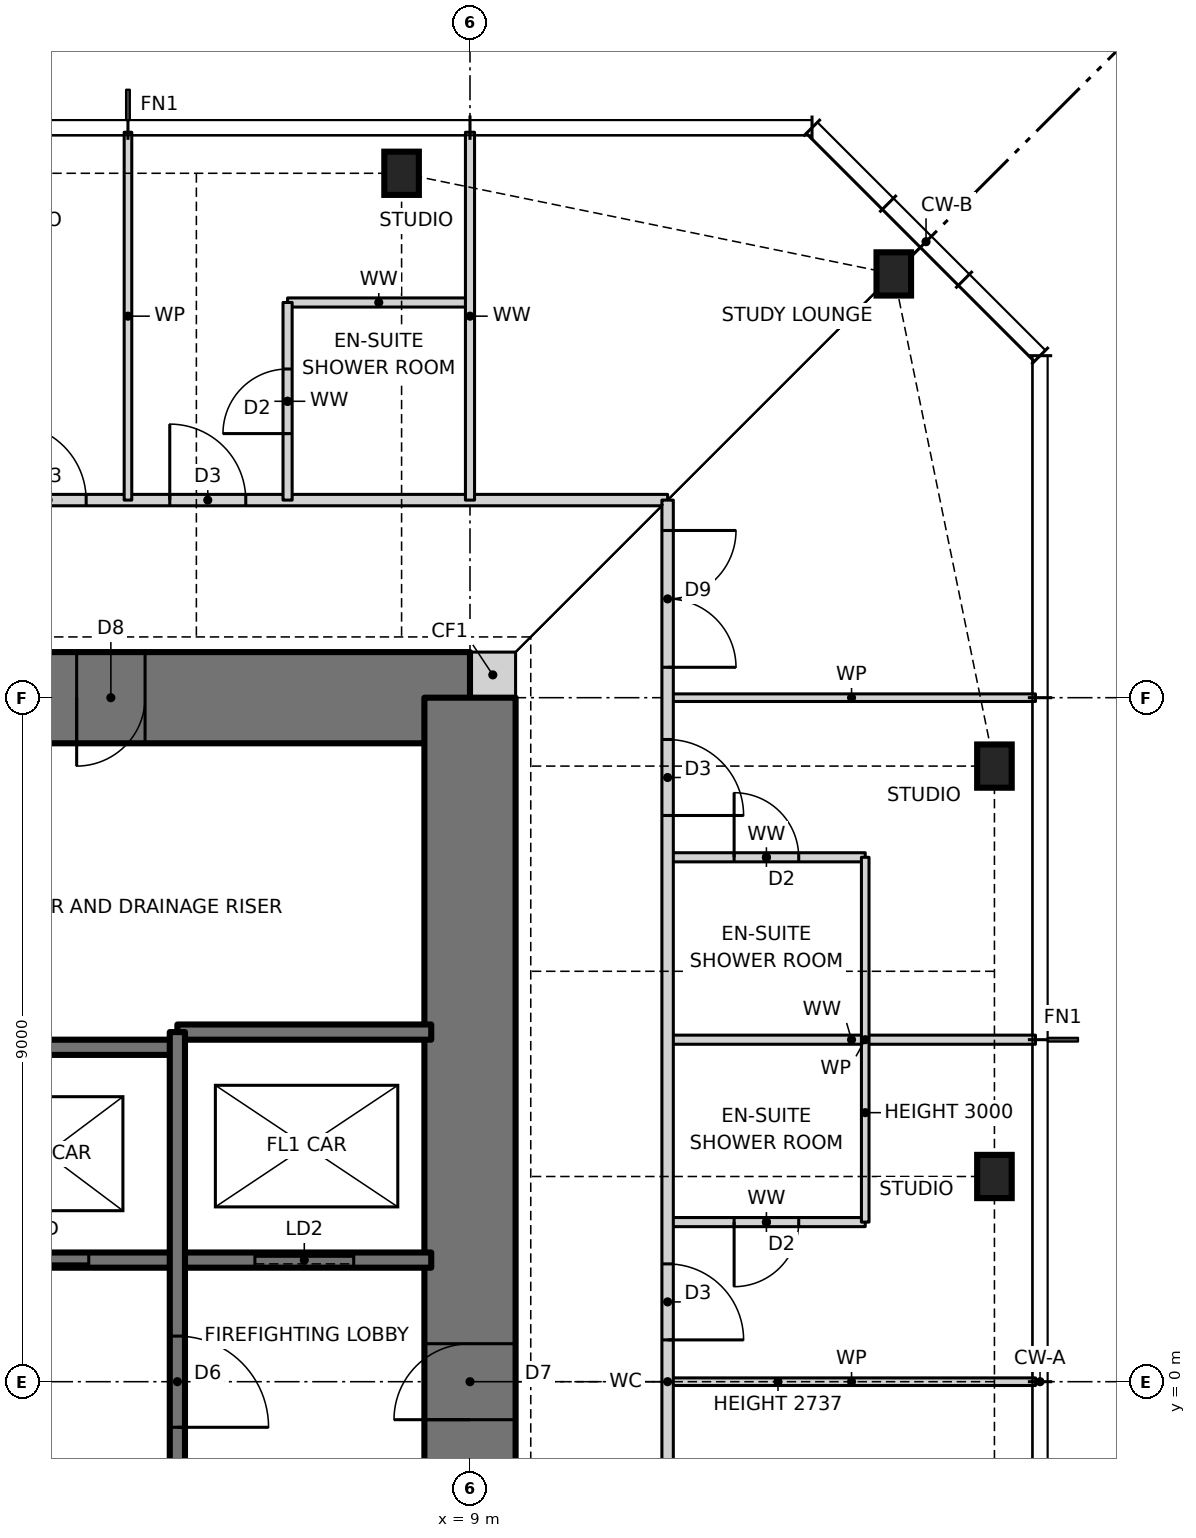
"""IFC4 building model, lengths in metres.
Left out: names, types, materials, properties, quantities, classifications, styles, units other than length and angle.
Written with IfcOpenShell. Run it as: python <this file> out.ifc"""

import sys

from ifc_helpers import new_model, si_unit, direction, frame, frame_2d, origin, origin_2d, place, context, subcontext, project, spatial, rectangle, i_section, extrude, element, fill, save


model = new_model("IFC4")
c1 = context("Model", 3, precision=1e-05, world=origin(), true_north=direction((0.0, 1.0)))
c2 = subcontext(c1, "Body", "Model", "MODEL_VIEW")
j1 = project(units=[si_unit("LENGTHUNIT", "METRE"), si_unit("PLANEANGLEUNIT", "RADIAN")], contexts=[c1])
p1 = place(None, origin())
s1 = spatial("IfcSite", under=j1, at=p1, CompositionType="ELEMENT")
p2 = place(p1, origin())
s2 = spatial("IfcBuilding", under=s1, at=p2, CompositionType="ELEMENT")
p3 = place(p2, frame((0.0, 0.0, 225.5)))
s3 = spatial("IfcBuildingStorey", under=s2, at=p3, CompositionType="ELEMENT", Elevation=225.5)
for number, where, z_axis, x_axis in (
    (1, (15.9, 2.7, 0.0), (0.0, 0.0, 1.0), (1.0, 0.0, 0.0)),
    (2, (15.9, 8.1, 0.0), (0.0, 0.0, 1.0), (1.0, 0.0, 0.0)),
    (3, (14.576, 14.576, 0.0), (0.0, 0.0, 1.0), (1.0, 0.0, 0.0)),
    (4, (8.1, 15.9, 0.0), (0.0, 0.0, 1.0), (1.0, 0.0, 0.0)),
):
    element("IfcColumn", number, at=place(p3, frame(where, z_axis=z_axis, x_axis=x_axis)), inside=s3, PredefinedType="COLUMN", context=c2, shape_type="SweptSolid", body=[
        extrude(i_section(OverallWidth=0.455, OverallDepth=0.569, WebThickness=0.078, FlangeThickness=0.125, at=origin_2d()), origin(), (0.0, 0.0, 1.0), 3.5),
    ])
p4 = place(p3, frame((9.0, 9.3, 0.0), z_axis=(0.0, 0.0, 1.0), x_axis=(1.0, 0.0, 0.0)))
e5 = element("IfcWall", 5, at=p4, inside=s3, PredefinedType="SOLIDWALL", context=c2, shape_type="SweptSolid", body=[
    extrude(rectangle(XDim=0.6, YDim=0.6, at=frame_2d((0.3, 0.0))), origin(), (0.0, 0.0, 1.0), 3.5),
])
p5 = place(p3, frame((9.0, 9.0, 0.0), z_axis=(0.0, 0.0, 1.0), x_axis=(-1.0, 0.0, 0.0)))
e6 = element("IfcWall", 6, at=p5, inside=s3, PredefinedType="SHEAR", context=c2, shape_type="SweptSolid", body=[
    extrude(rectangle(XDim=18.0, YDim=1.2, at=frame_2d((9.0, 0.0))), origin(), (0.0, 0.0, 1.0), 3.5),
])
p6 = place(p5, frame((11.125, 0.0, 0.0)))
e7 = element("IfcOpeningElement", 7, at=p6, cuts=e6, PredefinedType="OPENING", context=c2, shape_type="SweptSolid", body=[
    extrude(rectangle(XDim=0.9, YDim=2.1, at=frame_2d((0.45, 1.05))), frame((0.0, 0.61, 0.0), z_axis=(0.0, -1.0, 0.0), x_axis=(1.0, 0.0, 0.0)), (0.0, 0.0, 1.0), 1.22),
])
p7 = place(p5, frame((4.275, 0.0, 0.0)))
e8 = element("IfcOpeningElement", 8, at=p7, cuts=e6, PredefinedType="OPENING", context=c2, shape_type="SweptSolid", body=[
    extrude(rectangle(XDim=0.9, YDim=2.1, at=frame_2d((0.45, 1.05))), frame((0.0, 0.61, 0.0), z_axis=(0.0, -1.0, 0.0), x_axis=(1.0, 0.0, 0.0)), (0.0, 0.0, 1.0), 1.22),
])
p8 = place(p3, frame((9.0, -9.0, 0.0), z_axis=(0.0, 0.0, 1.0), x_axis=(0.0, 1.0, 0.0)))
e9 = element("IfcWall", 9, at=p8, inside=s3, PredefinedType="SHEAR", context=c2, shape_type="SweptSolid", body=[
    extrude(rectangle(XDim=18.0, YDim=1.2, at=frame_2d((9.0, 0.0))), origin(), (0.0, 0.0, 1.0), 3.5),
])
p9 = place(p8, frame((8.5, 0.0, 0.0)))
e10 = element("IfcOpeningElement", 10, at=p9, cuts=e9, PredefinedType="OPENING", context=c2, shape_type="SweptSolid", body=[
    extrude(rectangle(XDim=1.0, YDim=2.1, at=frame_2d((0.5, 1.05))), frame((0.0, 0.61, 0.0), z_axis=(0.0, -1.0, 0.0), x_axis=(1.0, 0.0, 0.0)), (0.0, 0.0, 1.0), 1.22),
])
p10 = place(p3, frame((11.6, 0.0, 0.0), z_axis=(0.0, 0.0, 1.0), x_axis=(1.0, 0.0, 0.0)))
e11 = element("IfcWall", 11, at=p10, inside=s3, PredefinedType="PARTITIONING", context=c2, shape_type="SweptSolid", body=[
    extrude(rectangle(XDim=4.84, YDim=0.1, at=frame_2d((2.42, 0.0))), origin(), (0.0, 0.0, 1.0), 2.737),
])
p11 = place(p3, frame((-8.49, 1.6, 0.0), z_axis=(0.0, 0.0, 1.0), x_axis=(1.0, 0.0, 0.0)))
e12 = element("IfcWall", 12, at=p11, inside=s3, PredefinedType="SOLIDWALL", context=c2, shape_type="SweptSolid", body=[
    extrude(rectangle(XDim=16.98, YDim=0.2, at=frame_2d((8.49, 0.0))), origin(), (0.0, 0.0, 1.0), 3.5),
])
p12 = place(p11, frame((1.17, 0.0, 0.0)))
e13 = element("IfcOpeningElement", 13, at=p12, cuts=e12, PredefinedType="OPENING", context=c2, shape_type="SweptSolid", body=[
    extrude(rectangle(XDim=1.0, YDim=2.1, at=frame_2d((0.5, 1.05))), frame((0.0, 0.11, 0.0), z_axis=(0.0, -1.0, 0.0), x_axis=(1.0, 0.0, 0.0)), (0.0, 0.0, 1.0), 0.22),
])
p13 = place(p11, frame((4.606, 0.0, 0.0)))
e14 = element("IfcOpeningElement", 14, at=p13, cuts=e12, PredefinedType="OPENING", context=c2, shape_type="SweptSolid", body=[
    extrude(rectangle(XDim=0.9, YDim=2.1, at=frame_2d((0.45, 1.05))), frame((0.0, 0.11, 0.0), z_axis=(0.0, -1.0, 0.0), x_axis=(1.0, 0.0, 0.0)), (0.0, 0.0, 1.0), 0.22),
])
p14 = place(p11, frame((8.04, 0.0, 0.0)))
e15 = element("IfcOpeningElement", 15, at=p14, cuts=e12, PredefinedType="OPENING", context=c2, shape_type="SweptSolid", body=[
    extrude(rectangle(XDim=0.9, YDim=2.1, at=frame_2d((0.45, 1.05))), frame((0.0, 0.11, 0.0), z_axis=(0.0, -1.0, 0.0), x_axis=(1.0, 0.0, 0.0)), (0.0, 0.0, 1.0), 0.22),
])
p15 = place(p11, frame((11.374, 0.0, 0.0)))
e16 = element("IfcOpeningElement", 16, at=p15, cuts=e12, PredefinedType="OPENING", context=c2, shape_type="SweptSolid", body=[
    extrude(rectangle(XDim=1.1, YDim=2.1, at=frame_2d((0.55, 1.05))), frame((0.0, 0.11, 0.0), z_axis=(0.0, -1.0, 0.0), x_axis=(1.0, 0.0, 0.0)), (0.0, 0.0, 1.0), 0.22),
])
p16 = place(p11, frame((14.66, 0.0, 0.0)))
e17 = element("IfcOpeningElement", 17, at=p16, cuts=e12, PredefinedType="OPENING", context=c2, shape_type="SweptSolid", body=[
    extrude(rectangle(XDim=1.3, YDim=2.1, at=frame_2d((0.65, 1.05))), frame((0.0, 0.11, 0.0), z_axis=(0.0, -1.0, 0.0), x_axis=(1.0, 0.0, 0.0)), (0.0, 0.0, 1.0), 0.22),
])
p17 = place(p3, frame((11.6, 2.1, 0.0), z_axis=(0.0, 0.0, 1.0), x_axis=(1.0, 0.0, 0.0)))
e18 = element("IfcWall", 18, at=p17, inside=s3, PredefinedType="PARTITIONING", context=c2, shape_type="SweptSolid", body=[
    extrude(rectangle(XDim=2.6, YDim=0.12, at=frame_2d((1.3, 0.0))), origin(), (0.0, 0.0, 1.0), 3.27),
])
p18 = place(p17, frame((0.875, 0.0, 0.0)))
e19 = element("IfcOpeningElement", 19, at=p18, cuts=e18, PredefinedType="OPENING", context=c2, shape_type="SweptSolid", body=[
    extrude(rectangle(XDim=0.85, YDim=2.1, at=frame_2d((0.425, 1.05))), frame((0.0, 0.07, 0.0), z_axis=(0.0, -1.0, 0.0), x_axis=(1.0, 0.0, 0.0)), (0.0, 0.0, 1.0), 0.14),
])
p19 = place(p3, frame((-5.15, 4.4, 0.0), z_axis=(0.0, 0.0, 1.0), x_axis=(1.0, 0.0, 0.0)))
e20 = element("IfcWall", 20, at=p19, inside=s3, PredefinedType="SOLIDWALL", context=c2, shape_type="SweptSolid", body=[
    extrude(rectangle(XDim=10.3, YDim=0.2, at=frame_2d((5.15, 0.0))), origin(), (0.0, 0.0, 1.0), 3.5),
])
p20 = place(p3, frame((11.6, 4.5, 0.0), z_axis=(0.0, 0.0, 1.0), x_axis=(1.0, 0.0, 0.0)))
e21 = element("IfcWall", 21, at=p20, inside=s3, PredefinedType="PARTITIONING", context=c2, shape_type="SweptSolid", body=[
    extrude(rectangle(XDim=4.84, YDim=0.12, at=frame_2d((2.42, 0.0))), origin(), (0.0, 0.0, 1.0), 3.27),
])
p21 = place(p3, frame((5.15, 4.6, 0.0), z_axis=(0.0, 0.0, 1.0), x_axis=(1.0, 0.0, 0.0)))
e22 = element("IfcWall", 22, at=p21, inside=s3, PredefinedType="SOLIDWALL", context=c2, shape_type="SweptSolid", body=[
    extrude(rectangle(XDim=3.34, YDim=0.2, at=frame_2d((1.67, 0.0))), origin(), (0.0, 0.0, 1.0), 3.5),
])
p22 = place(p3, frame((11.6, 6.9, 0.0), z_axis=(0.0, 0.0, 1.0), x_axis=(1.0, 0.0, 0.0)))
e23 = element("IfcWall", 23, at=p22, inside=s3, PredefinedType="PARTITIONING", context=c2, shape_type="SweptSolid", body=[
    extrude(rectangle(XDim=2.6, YDim=0.12, at=frame_2d((1.3, 0.0))), origin(), (0.0, 0.0, 1.0), 3.27),
])
p23 = place(p22, frame((0.875, 0.0, 0.0)))
e24 = element("IfcOpeningElement", 24, at=p23, cuts=e23, PredefinedType="OPENING", context=c2, shape_type="SweptSolid", body=[
    extrude(rectangle(XDim=0.85, YDim=2.1, at=frame_2d((0.425, 1.05))), frame((0.0, 0.07, 0.0), z_axis=(0.0, -1.0, 0.0), x_axis=(1.0, 0.0, 0.0)), (0.0, 0.0, 1.0), 0.14),
])
p24 = place(p3, frame((11.6, 9.0, 0.0), z_axis=(0.0, 0.0, 1.0), x_axis=(1.0, 0.0, 0.0)))
e25 = element("IfcWall", 25, at=p24, inside=s3, PredefinedType="PARTITIONING", context=c2, shape_type="SweptSolid", body=[
    extrude(rectangle(XDim=4.84, YDim=0.1, at=frame_2d((2.42, 0.0))), origin(), (0.0, 0.0, 1.0), 3.27),
])
p25 = place(p3, frame((-11.6, 11.6, 0.0), z_axis=(0.0, 0.0, 1.0), x_axis=(1.0, 0.0, 0.0)))
e26 = element("IfcWall", 26, at=p25, inside=s3, PredefinedType="PARTITIONING", context=c2, shape_type="SweptSolid", body=[
    extrude(rectangle(XDim=23.2, YDim=0.15, at=frame_2d((11.6, 0.0))), origin(), (0.0, 0.0, 1.0), 3.27),
])
p26 = place(p25, frame((16.65, 0.0, 0.0)))
e27 = element("IfcOpeningElement", 27, at=p26, cuts=e26, PredefinedType="OPENING", context=c2, shape_type="SweptSolid", body=[
    extrude(rectangle(XDim=1.0, YDim=2.1, at=frame_2d((0.5, 1.05))), frame((0.0, 0.085, 0.0), z_axis=(0.0, -1.0, 0.0), x_axis=(1.0, 0.0, 0.0)), (0.0, 0.0, 1.0), 0.17),
])
p27 = place(p25, frame((14.55, 0.0, 0.0)))
e28 = element("IfcOpeningElement", 28, at=p27, cuts=e26, PredefinedType="OPENING", context=c2, shape_type="SweptSolid", body=[
    extrude(rectangle(XDim=1.0, YDim=2.1, at=frame_2d((0.5, 1.05))), frame((0.0, 0.085, 0.0), z_axis=(0.0, -1.0, 0.0), x_axis=(1.0, 0.0, 0.0)), (0.0, 0.0, 1.0), 0.17),
])
p28 = place(p25, frame((7.65, 0.0, 0.0)))
e29 = element("IfcOpeningElement", 29, at=p28, cuts=e26, PredefinedType="OPENING", context=c2, shape_type="SweptSolid", body=[
    extrude(rectangle(XDim=1.0, YDim=2.1, at=frame_2d((0.5, 1.05))), frame((0.0, 0.085, 0.0), z_axis=(0.0, -1.0, 0.0), x_axis=(1.0, 0.0, 0.0)), (0.0, 0.0, 1.0), 0.17),
])
p29 = place(p25, frame((5.55, 0.0, 0.0)))
e30 = element("IfcOpeningElement", 30, at=p29, cuts=e26, PredefinedType="OPENING", context=c2, shape_type="SweptSolid", body=[
    extrude(rectangle(XDim=1.0, YDim=2.1, at=frame_2d((0.5, 1.05))), frame((0.0, 0.085, 0.0), z_axis=(0.0, -1.0, 0.0), x_axis=(1.0, 0.0, 0.0)), (0.0, 0.0, 1.0), 0.17),
])
p30 = place(p25, frame((0.4, 0.0, 0.0)))
e31 = element("IfcOpeningElement", 31, at=p30, cuts=e26, PredefinedType="OPENING", context=c2, shape_type="SweptSolid", body=[
    extrude(rectangle(XDim=1.8, YDim=2.1, at=frame_2d((0.9, 1.05))), frame((0.0, 0.085, 0.0), z_axis=(0.0, -1.0, 0.0), x_axis=(1.0, 0.0, 0.0)), (0.0, 0.0, 1.0), 0.17),
])
p31 = place(p3, frame((6.6, 14.2, 0.0), z_axis=(0.0, 0.0, 1.0), x_axis=(1.0, 0.0, 0.0)))
e32 = element("IfcWall", 32, at=p31, inside=s3, PredefinedType="PARTITIONING", context=c2, shape_type="SweptSolid", body=[
    extrude(rectangle(XDim=2.4, YDim=0.12, at=frame_2d((1.2, 0.0))), origin(), (0.0, 0.0, 1.0), 3.27),
])
p32 = place(p3, frame((14.2, 2.1, 0.0), z_axis=(0.0, 0.0, 1.0), x_axis=(0.0, 1.0, 0.0)))
e33 = element("IfcWall", 33, at=p32, inside=s3, PredefinedType="PARTITIONING", context=c2, shape_type="SweptSolid", body=[
    extrude(rectangle(XDim=4.8, YDim=0.1, at=frame_2d((2.4, 0.0))), origin(), (0.0, 0.0, 1.0), 3.0),
])
p33 = place(p3, frame((11.6, -11.6, 0.0), z_axis=(0.0, 0.0, 1.0), x_axis=(0.0, 1.0, 0.0)))
e34 = element("IfcWall", 34, at=p33, inside=s3, PredefinedType="PARTITIONING", context=c2, shape_type="SweptSolid", body=[
    extrude(rectangle(XDim=23.2, YDim=0.15, at=frame_2d((11.6, 0.0))), origin(), (0.0, 0.0, 1.0), 3.27),
])
p34 = place(p33, frame((5.7, 0.0, 0.0)))
e35 = element("IfcOpeningElement", 35, at=p34, cuts=e34, PredefinedType="OPENING", context=c2, shape_type="SweptSolid", body=[
    extrude(rectangle(XDim=1.0, YDim=2.1, at=frame_2d((0.5, 1.05))), frame((0.0, 0.085, 0.0), z_axis=(0.0, -1.0, 0.0), x_axis=(1.0, 0.0, 0.0)), (0.0, 0.0, 1.0), 0.17),
])
p35 = place(p33, frame((12.15, 0.0, 0.0)))
e36 = element("IfcOpeningElement", 36, at=p35, cuts=e34, PredefinedType="OPENING", context=c2, shape_type="SweptSolid", body=[
    extrude(rectangle(XDim=1.0, YDim=2.1, at=frame_2d((0.5, 1.05))), frame((0.0, 0.085, 0.0), z_axis=(0.0, -1.0, 0.0), x_axis=(1.0, 0.0, 0.0)), (0.0, 0.0, 1.0), 0.17),
])
p36 = place(p33, frame((19.05, 0.0, 0.0)))
e37 = element("IfcOpeningElement", 37, at=p36, cuts=e34, PredefinedType="OPENING", context=c2, shape_type="SweptSolid", body=[
    extrude(rectangle(XDim=1.0, YDim=2.1, at=frame_2d((0.5, 1.05))), frame((0.0, 0.085, 0.0), z_axis=(0.0, -1.0, 0.0), x_axis=(1.0, 0.0, 0.0)), (0.0, 0.0, 1.0), 0.17),
])
p37 = place(p33, frame((21.0, 0.0, 0.0)))
e38 = element("IfcOpeningElement", 38, at=p37, cuts=e34, PredefinedType="OPENING", context=c2, shape_type="SweptSolid", body=[
    extrude(rectangle(XDim=1.8, YDim=2.1, at=frame_2d((0.9, 1.05))), frame((0.0, 0.085, 0.0), z_axis=(0.0, -1.0, 0.0), x_axis=(1.0, 0.0, 0.0)), (0.0, 0.0, 1.0), 0.17),
])
p38 = place(p3, frame((9.0, 11.6, 0.0), z_axis=(0.0, 0.0, 1.0), x_axis=(0.0, 1.0, 0.0)))
e39 = element("IfcWall", 39, at=p38, inside=s3, PredefinedType="PARTITIONING", context=c2, shape_type="SweptSolid", body=[
    extrude(rectangle(XDim=4.84, YDim=0.12, at=frame_2d((2.42, 0.0))), origin(), (0.0, 0.0, 1.0), 3.27),
])
p39 = place(p3, frame((6.6, 11.6, 0.0), z_axis=(0.0, 0.0, 1.0), x_axis=(0.0, 1.0, 0.0)))
e40 = element("IfcWall", 40, at=p39, inside=s3, PredefinedType="PARTITIONING", context=c2, shape_type="SweptSolid", body=[
    extrude(rectangle(XDim=2.6, YDim=0.12, at=frame_2d((1.3, 0.0))), origin(), (0.0, 0.0, 1.0), 3.27),
])
p40 = place(p39, frame((0.875, 0.0, 0.0)))
e41 = element("IfcOpeningElement", 41, at=p40, cuts=e40, PredefinedType="OPENING", context=c2, shape_type="SweptSolid", body=[
    extrude(rectangle(XDim=0.85, YDim=2.1, at=frame_2d((0.425, 1.05))), frame((0.0, 0.07, 0.0), z_axis=(0.0, -1.0, 0.0), x_axis=(1.0, 0.0, 0.0)), (0.0, 0.0, 1.0), 0.14),
])
p41 = place(p3, frame((5.15, -8.49, 0.0), z_axis=(0.0, 0.0, 1.0), x_axis=(0.0, 1.0, 0.0)))
e42 = element("IfcWall", 42, at=p41, inside=s3, PredefinedType="SOLIDWALL", context=c2, shape_type="SweptSolid", body=[
    extrude(rectangle(XDim=13.09, YDim=0.2, at=frame_2d((6.545, 0.0))), origin(), (0.0, 0.0, 1.0), 3.5),
])
p42 = place(p41, frame((7.89, 0.0, 0.0)))
e43 = element("IfcOpeningElement", 43, at=p42, cuts=e42, PredefinedType="OPENING", context=c2, shape_type="SweptSolid", body=[
    extrude(rectangle(XDim=1.2, YDim=2.1, at=frame_2d((0.6, 1.05))), frame((0.0, 0.11, 0.0), z_axis=(0.0, -1.0, 0.0), x_axis=(1.0, 0.0, 0.0)), (0.0, 0.0, 1.0), 0.22),
])
p43 = place(p3, frame((4.5, 11.6, 0.0), z_axis=(0.0, 0.0, 1.0), x_axis=(0.0, 1.0, 0.0)))
e44 = element("IfcWall", 44, at=p43, inside=s3, PredefinedType="PARTITIONING", context=c2, shape_type="SweptSolid", body=[
    extrude(rectangle(XDim=4.84, YDim=0.1, at=frame_2d((2.42, 0.0))), origin(), (0.0, 0.0, 1.0), 3.27),
])
p44 = place(p42, frame((1.2, 0.0, 0.0), z_axis=(0.0, 0.0, 1.0), x_axis=(-1.0, 0.0, 0.0)))
e45 = element("IfcDoor", 45, at=p44, inside=s3, OperationType="SINGLE_SWING_RIGHT", PredefinedType="DOOR", context=c2, shape_type="SweptSolid", body=[
    extrude(rectangle(XDim=1.2, YDim=2.1, at=frame_2d((0.6, 1.05))), frame((0.0, 0.025, 0.0), z_axis=(0.0, -1.0, 0.0), x_axis=(1.0, 0.0, 0.0)), (0.0, 0.0, 1.0), 0.05),
])
fill(e43, e45)
p45 = place(p35, frame((1.0, 0.0, 0.0), z_axis=(0.0, 0.0, 1.0), x_axis=(-1.0, 0.0, 0.0)))
e46 = element("IfcDoor", 46, at=p45, inside=s3, OperationType="SINGLE_SWING_RIGHT", PredefinedType="DOOR", context=c2, shape_type="SweptSolid", body=[
    extrude(rectangle(XDim=1.0, YDim=2.1, at=frame_2d((0.5, 1.05))), frame((0.0, 0.025, 0.0), z_axis=(0.0, -1.0, 0.0), x_axis=(1.0, 0.0, 0.0)), (0.0, 0.0, 1.0), 0.05),
])
fill(e36, e46)
p46 = place(p18, frame((0.85, 0.0, 0.0), z_axis=(0.0, 0.0, 1.0), x_axis=(-1.0, 0.0, 0.0)))
e47 = element("IfcDoor", 47, at=p46, inside=s3, OperationType="SINGLE_SWING_RIGHT", PredefinedType="DOOR", context=c2, shape_type="SweptSolid", body=[
    extrude(rectangle(XDim=0.85, YDim=2.1, at=frame_2d((0.425, 1.05))), frame((0.0, 0.025, 0.0), z_axis=(0.0, -1.0, 0.0), x_axis=(1.0, 0.0, 0.0)), (0.0, 0.0, 1.0), 0.05),
])
fill(e19, e47)
p47 = place(p36, frame((1.0, 0.0, 0.0), z_axis=(0.0, 0.0, 1.0), x_axis=(-1.0, 0.0, 0.0)))
e48 = element("IfcDoor", 48, at=p47, inside=s3, OperationType="SINGLE_SWING_RIGHT", PredefinedType="DOOR", context=c2, shape_type="SweptSolid", body=[
    extrude(rectangle(XDim=1.0, YDim=2.1, at=frame_2d((0.5, 1.05))), frame((0.0, 0.025, 0.0), z_axis=(0.0, -1.0, 0.0), x_axis=(1.0, 0.0, 0.0)), (0.0, 0.0, 1.0), 0.05),
])
fill(e37, e48)
p48 = place(p23, origin())
e49 = element("IfcDoor", 49, at=p48, inside=s3, OperationType="SINGLE_SWING_LEFT", PredefinedType="DOOR", context=c2, shape_type="SweptSolid", body=[
    extrude(rectangle(XDim=0.85, YDim=2.1, at=frame_2d((0.425, 1.05))), frame((0.0, 0.025, 0.0), z_axis=(0.0, -1.0, 0.0), x_axis=(1.0, 0.0, 0.0)), (0.0, 0.0, 1.0), 0.05),
])
fill(e24, e49)
p49 = place(p26, origin())
e50 = element("IfcDoor", 50, at=p49, inside=s3, OperationType="SINGLE_SWING_LEFT", PredefinedType="DOOR", context=c2, shape_type="SweptSolid", body=[
    extrude(rectangle(XDim=1.0, YDim=2.1, at=frame_2d((0.5, 1.05))), frame((0.0, 0.025, 0.0), z_axis=(0.0, -1.0, 0.0), x_axis=(1.0, 0.0, 0.0)), (0.0, 0.0, 1.0), 0.05),
])
fill(e27, e50)
p50 = place(p40, origin())
e51 = element("IfcDoor", 51, at=p50, inside=s3, OperationType="SINGLE_SWING_LEFT", PredefinedType="DOOR", context=c2, shape_type="SweptSolid", body=[
    extrude(rectangle(XDim=0.85, YDim=2.1, at=frame_2d((0.425, 1.05))), frame((0.0, 0.025, 0.0), z_axis=(0.0, -1.0, 0.0), x_axis=(1.0, 0.0, 0.0)), (0.0, 0.0, 1.0), 0.05),
])
fill(e41, e51)
p51 = place(p27, origin())
e52 = element("IfcDoor", 52, at=p51, inside=s3, OperationType="SINGLE_SWING_LEFT", PredefinedType="DOOR", context=c2, shape_type="SweptSolid", body=[
    extrude(rectangle(XDim=1.0, YDim=2.1, at=frame_2d((0.5, 1.05))), frame((0.0, 0.025, 0.0), z_axis=(0.0, -1.0, 0.0), x_axis=(1.0, 0.0, 0.0)), (0.0, 0.0, 1.0), 0.05),
])
fill(e28, e52)
p52 = place(p37, frame((1.8, 0.0, 0.0), z_axis=(0.0, 0.0, 1.0), x_axis=(-1.0, 0.0, 0.0)))
e53 = element("IfcDoor", 53, at=p52, inside=s3, OperationType="DOUBLE_DOOR_SINGLE_SWING", PredefinedType="DOOR", context=c2, shape_type="SweptSolid", body=[
    extrude(rectangle(XDim=1.8, YDim=2.1, at=frame_2d((0.9, 1.05))), frame((0.0, 0.025, 0.0), z_axis=(0.0, -1.0, 0.0), x_axis=(1.0, 0.0, 0.0)), (0.0, 0.0, 1.0), 0.05),
])
fill(e38, e53)
p53 = place(p9, origin())
e54 = element("IfcDoor", 54, at=p53, inside=s3, OperationType="SINGLE_SWING_LEFT", PredefinedType="DOOR", context=c2, shape_type="SweptSolid", body=[
    extrude(rectangle(XDim=1.0, YDim=2.1, at=frame_2d((0.5, 1.05))), frame((0.0, 0.025, 0.0), z_axis=(0.0, -1.0, 0.0), x_axis=(1.0, 0.0, 0.0)), (0.0, 0.0, 1.0), 0.05),
])
fill(e10, e54)
p54 = place(p7, origin())
e55 = element("IfcDoor", 55, at=p54, inside=s3, OperationType="SINGLE_SWING_RIGHT", PredefinedType="DOOR", context=c2, shape_type="SweptSolid", body=[
    extrude(rectangle(XDim=0.9, YDim=2.1, at=frame_2d((0.45, 1.05))), frame((0.0, 0.025, 0.0), z_axis=(0.0, -1.0, 0.0), x_axis=(1.0, 0.0, 0.0)), (0.0, 0.0, 1.0), 0.05),
])
fill(e8, e55)
p55 = place(p15, origin())
e56 = element("IfcDoor", 56, at=p55, inside=s3, OperationType="DOUBLE_DOOR_SLIDING", PredefinedType="DOOR", context=c2, shape_type="SweptSolid", body=[
    extrude(rectangle(XDim=1.1, YDim=2.1, at=frame_2d((0.55, 1.05))), frame((0.0, 0.025, 0.0), z_axis=(0.0, -1.0, 0.0), x_axis=(1.0, 0.0, 0.0)), (0.0, 0.0, 1.0), 0.05),
])
fill(e16, e56)
p56 = place(p16, origin())
e57 = element("IfcDoor", 57, at=p56, inside=s3, OperationType="SLIDING_TO_LEFT", PredefinedType="DOOR", context=c2, shape_type="SweptSolid", body=[
    extrude(rectangle(XDim=1.3, YDim=2.1, at=frame_2d((0.65, 1.05))), frame((0.0, 0.025, 0.0), z_axis=(0.0, -1.0, 0.0), x_axis=(1.0, 0.0, 0.0)), (0.0, 0.0, 1.0), 0.05),
])
fill(e17, e57)
save(model, sys.argv[1])
